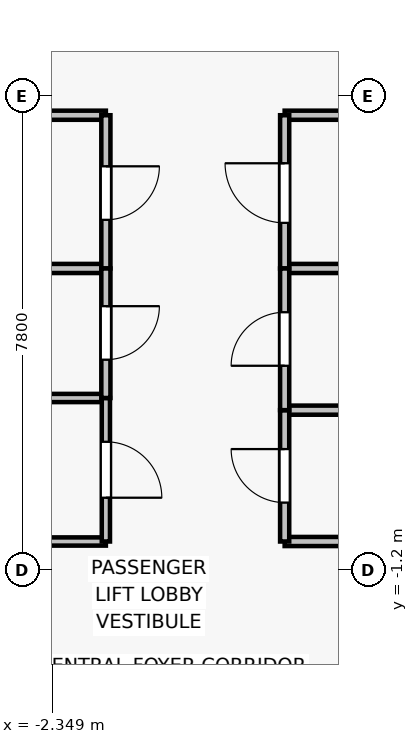
"""IFC4 building model, lengths in metres.
Left out: names, types, materials, properties, quantities, classifications, styles, units other than length and angle.
Written with IfcOpenShell. Run it as: python <this file> out.ifc"""

import sys

from ifc_helpers import new_model, si_unit, direction, frame, frame_2d, origin, place, context, subcontext, project, spatial, rectangle, extrude, source, transform, mapped, element, fill, save


model = new_model("IFC4")
c1 = context("Model", 3, precision=1e-05, world=origin(), true_north=direction((0.0, 1.0)))
c2 = subcontext(c1, "Body", "Model", "MODEL_VIEW")
j1 = project(units=[si_unit("LENGTHUNIT", "METRE"), si_unit("PLANEANGLEUNIT", "RADIAN")], contexts=[c1])
p1 = place(None, origin())
s1 = spatial("IfcSite", under=j1, at=p1, CompositionType="ELEMENT")
p2 = place(p1, origin())
s2 = spatial("IfcBuilding", under=s1, at=p2, CompositionType="ELEMENT")
p3 = place(p2, frame((0.0, 0.0, 222.1)))
s3 = spatial("IfcBuildingStorey", under=s2, at=p3, CompositionType="ELEMENT", Elevation=222.1)
for number, where, z_axis, x_axis in (
    (1, (-1.47, 3.76, 0.0), (0.0, 0.0, 1.0), (-1.0, 0.0, 0.0)),
    (2, (-3.87, 6.28, 0.0), (0.0, 0.0, 1.0), (1.0, 0.0, 0.0)),
):
    element("IfcWall", number, at=place(p3, frame(where, z_axis=z_axis, x_axis=x_axis)), inside=s3, PredefinedType="PARTITIONING", context=c2, shape_type="SweptSolid", body=[
        extrude(rectangle(XDim=2.4, YDim=0.15, at=frame_2d((1.2, 0.0))), origin(), (0.0, 0.0, 1.0), 3.075),
    ])
p4 = place(p3, frame((-1.47, 6.28, 0.0), z_axis=(0.0, 0.0, 1.0), x_axis=(0.0, -1.0, 0.0)))
e3 = element("IfcWall", 3, at=p4, inside=s3, PredefinedType="PARTITIONING", context=c2, shape_type="SweptSolid", body=[
    extrude(rectangle(XDim=2.52, YDim=0.15, at=frame_2d((1.26, 0.0))), origin(), (0.0, 0.0, 1.0), 3.075),
])
p5 = place(p4, frame((0.84, 0.0, 0.0)))
e4 = element("IfcOpeningElement", 4, at=p5, cuts=e3, PredefinedType="OPENING", context=c2, shape_type="SweptSolid", body=[
    extrude(rectangle(XDim=0.88, YDim=2.1, at=frame_2d((0.44, 1.05))), frame((0.0, 0.085, 0.0), z_axis=(0.0, -1.0, 0.0), x_axis=(1.0, 0.0, 0.0)), (0.0, 0.0, 1.0), 0.17),
])
for number, where, z_axis, x_axis in (
    (5, (6.38, 3.76, 0.0), (0.0, 0.0, 1.0), (-1.0, 0.0, 0.0)),
    (6, (1.47, 6.28, 0.0), (0.0, 0.0, 1.0), (1.0, 0.0, 0.0)),
):
    element("IfcWall", number, at=place(p3, frame(where, z_axis=z_axis, x_axis=x_axis)), inside=s3, PredefinedType="PARTITIONING", context=c2, shape_type="SweptSolid", body=[
        extrude(rectangle(XDim=4.91, YDim=0.15, at=frame_2d((2.455, 0.0))), origin(), (0.0, 0.0, 1.0), 3.075),
    ])
p6 = place(p3, frame((1.47, 3.76, 0.0), z_axis=(0.0, 0.0, 1.0), x_axis=(0.0, 1.0, 0.0)))
e7 = element("IfcWall", 7, at=p6, inside=s3, PredefinedType="PARTITIONING", context=c2, shape_type="SweptSolid", body=[
    extrude(rectangle(XDim=2.52, YDim=0.15, at=frame_2d((1.26, 0.0))), origin(), (0.0, 0.0, 1.0), 3.075),
])
p7 = place(p6, frame((0.75, 0.0, 0.0)))
e8 = element("IfcOpeningElement", 8, at=p7, cuts=e7, PredefinedType="OPENING", context=c2, shape_type="SweptSolid", body=[
    extrude(rectangle(XDim=0.98, YDim=2.15, at=frame_2d((0.49, 1.075))), frame((0.0, 0.085, 0.0), z_axis=(0.0, -1.0, 0.0), x_axis=(1.0, 0.0, 0.0)), (0.0, 0.0, 1.0), 0.17),
])
for number, where, z_axis, x_axis in (
    (9, (-1.47, -0.73, 0.0), (0.0, 0.0, 1.0), (-1.0, 0.0, 0.0)),
    (10, (-3.47, 1.63, 0.0), (0.0, 0.0, 1.0), (1.0, 0.0, 0.0)),
):
    element("IfcWall", number, at=place(p3, frame(where, z_axis=z_axis, x_axis=x_axis)), inside=s3, PredefinedType="PARTITIONING", context=c2, shape_type="SweptSolid", body=[
        extrude(rectangle(XDim=2.0, YDim=0.135, at=frame_2d((1.0, 0.0))), origin(), (0.0, 0.0, 1.0), 3.075),
    ])
p8 = place(p3, frame((-1.47, 1.63, 0.0), z_axis=(0.0, 0.0, 1.0), x_axis=(0.0, -1.0, 0.0)))
e11 = element("IfcWall", 11, at=p8, inside=s3, PredefinedType="PARTITIONING", context=c2, shape_type="SweptSolid", body=[
    extrude(rectangle(XDim=2.36, YDim=0.135, at=frame_2d((1.18, 0.0))), origin(), (0.0, 0.0, 1.0), 3.075),
])
p9 = place(p8, frame((0.72, 0.0, 0.0)))
e12 = element("IfcOpeningElement", 12, at=p9, cuts=e11, PredefinedType="OPENING", context=c2, shape_type="SweptSolid", body=[
    extrude(rectangle(XDim=0.92, YDim=2.1, at=frame_2d((0.46, 1.05))), frame((0.0, 0.077, 0.0), z_axis=(0.0, -1.0, 0.0), x_axis=(1.0, 0.0, 0.0)), (0.0, 0.0, 1.0), 0.155),
])
p10 = place(p3, frame((-1.47, 3.76, 0.0), z_axis=(0.0, 0.0, 1.0), x_axis=(0.0, -1.0, 0.0)))
e13 = element("IfcWall", 13, at=p10, inside=s3, PredefinedType="PARTITIONING", context=c2, shape_type="SweptSolid", body=[
    extrude(rectangle(XDim=2.13, YDim=0.15, at=frame_2d((1.065, 0.0))), origin(), (0.0, 0.0, 1.0), 3.075),
])
p11 = place(p10, frame((0.62, 0.0, 0.0)))
e14 = element("IfcOpeningElement", 14, at=p11, cuts=e13, PredefinedType="OPENING", context=c2, shape_type="SweptSolid", body=[
    extrude(rectangle(XDim=0.88, YDim=2.1, at=frame_2d((0.44, 1.05))), frame((0.0, 0.085, 0.0), z_axis=(0.0, -1.0, 0.0), x_axis=(1.0, 0.0, 0.0)), (0.0, 0.0, 1.0), 0.17),
])
for number, where, z_axis, x_axis in (
    (15, (3.68, -0.73, 0.0), (0.0, 0.0, 1.0), (-1.0, 0.0, 0.0)),
    (16, (1.47, 1.43, 0.0), (0.0, 0.0, 1.0), (1.0, 0.0, 0.0)),
):
    element("IfcWall", number, at=place(p3, frame(where, z_axis=z_axis, x_axis=x_axis)), inside=s3, PredefinedType="PARTITIONING", context=c2, shape_type="SweptSolid", body=[
        extrude(rectangle(XDim=2.21, YDim=0.15, at=frame_2d((1.105, 0.0))), origin(), (0.0, 0.0, 1.0), 3.075),
    ])
p12 = place(p3, frame((1.47, -0.73, 0.0), z_axis=(0.0, 0.0, 1.0), x_axis=(0.0, 1.0, 0.0)))
e17 = element("IfcWall", 17, at=p12, inside=s3, PredefinedType="PARTITIONING", context=c2, shape_type="SweptSolid", body=[
    extrude(rectangle(XDim=2.16, YDim=0.15, at=frame_2d((1.08, 0.0))), origin(), (0.0, 0.0, 1.0), 3.075),
])
p13 = place(p12, frame((0.64, 0.0, 0.0)))
e18 = element("IfcOpeningElement", 18, at=p13, cuts=e17, PredefinedType="OPENING", context=c2, shape_type="SweptSolid", body=[
    extrude(rectangle(XDim=0.88, YDim=2.1, at=frame_2d((0.44, 1.05))), frame((0.0, 0.085, 0.0), z_axis=(0.0, -1.0, 0.0), x_axis=(1.0, 0.0, 0.0)), (0.0, 0.0, 1.0), 0.17),
])
p14 = place(p3, frame((1.47, 1.43, 0.0), z_axis=(0.0, 0.0, 1.0), x_axis=(0.0, 1.0, 0.0)))
e19 = element("IfcWall", 19, at=p14, inside=s3, PredefinedType="PARTITIONING", context=c2, shape_type="SweptSolid", body=[
    extrude(rectangle(XDim=2.33, YDim=0.15, at=frame_2d((1.165, 0.0))), origin(), (0.0, 0.0, 1.0), 3.075),
])
p15 = place(p14, frame((0.73, 0.0, 0.0)))
e20 = element("IfcOpeningElement", 20, at=p15, cuts=e19, PredefinedType="OPENING", context=c2, shape_type="SweptSolid", body=[
    extrude(rectangle(XDim=0.88, YDim=2.15, at=frame_2d((0.44, 1.075))), frame((0.0, 0.085, 0.0), z_axis=(0.0, -1.0, 0.0), x_axis=(1.0, 0.0, 0.0)), (0.0, 0.0, 1.0), 0.17),
])
m1 = source(origin(), c2, "Body", "SweptSolid", [
    extrude(rectangle(XDim=0.88, YDim=2.1, at=frame_2d((0.44, 1.05))), frame((0.0, 0.025, 0.0), z_axis=(0.0, -1.0, 0.0), x_axis=(1.0, 0.0, 0.0)), (0.0, 0.0, 1.0), 0.05),
])
p16 = place(p5, origin())
e21 = element("IfcDoor", 21, at=p16, inside=s3, OperationType="SINGLE_SWING_LEFT", PredefinedType="DOOR", context=c2, shape_type="MappedRepresentation", body=[
    mapped(m1, transform((0.0, 0.0, 0.0), x_axis=(1.0, 0.0, 0.0), y_axis=(0.0, 1.0, 0.0), z_axis=(0.0, 0.0, 1.0), scale=1.0)),
])
fill(e4, e21)
m2 = source(origin(), c2, "Body", "SweptSolid", [
    extrude(rectangle(XDim=0.98, YDim=2.15, at=frame_2d((0.49, 1.075))), frame((0.0, 0.025, 0.0), z_axis=(0.0, -1.0, 0.0), x_axis=(1.0, 0.0, 0.0)), (0.0, 0.0, 1.0), 0.05),
])
p17 = place(p7, origin())
e22 = element("IfcDoor", 22, at=p17, inside=s3, OperationType="SINGLE_SWING_RIGHT", PredefinedType="DOOR", context=c2, shape_type="MappedRepresentation", body=[
    mapped(m2, transform((0.0, 0.0, 0.0), x_axis=(1.0, 0.0, 0.0), y_axis=(0.0, 1.0, 0.0), z_axis=(0.0, 0.0, 1.0), scale=1.0)),
])
fill(e8, e22)
m3 = source(origin(), c2, "Body", "SweptSolid", [
    extrude(rectangle(XDim=0.92, YDim=2.1, at=frame_2d((0.46, 1.05))), frame((0.0, 0.025, 0.0), z_axis=(0.0, -1.0, 0.0), x_axis=(1.0, 0.0, 0.0)), (0.0, 0.0, 1.0), 0.05),
])
p18 = place(p9, origin())
e23 = element("IfcDoor", 23, at=p18, inside=s3, OperationType="SINGLE_SWING_RIGHT", PredefinedType="DOOR", context=c2, shape_type="MappedRepresentation", body=[
    mapped(m3, transform((0.0, 0.0, 0.0), x_axis=(1.0, 0.0, 0.0), y_axis=(0.0, 1.0, 0.0), z_axis=(0.0, 0.0, 1.0), scale=1.0)),
])
fill(e12, e23)
p19 = place(p11, origin())
e24 = element("IfcDoor", 24, at=p19, inside=s3, OperationType="SINGLE_SWING_LEFT", PredefinedType="DOOR", context=c2, shape_type="MappedRepresentation", body=[
    mapped(m1, transform((0.0, 0.0, 0.0), x_axis=(1.0, 0.0, 0.0), y_axis=(0.0, 1.0, 0.0), z_axis=(0.0, 0.0, 1.0), scale=1.0)),
])
fill(e14, e24)
p20 = place(p13, origin())
e25 = element("IfcDoor", 25, at=p20, inside=s3, OperationType="SINGLE_SWING_RIGHT", PredefinedType="DOOR", context=c2, shape_type="MappedRepresentation", body=[
    mapped(m1, transform((0.0, 0.0, 0.0), x_axis=(1.0, 0.0, 0.0), y_axis=(0.0, 1.0, 0.0), z_axis=(0.0, 0.0, 1.0), scale=1.0)),
])
fill(e18, e25)
m4 = source(origin(), c2, "Body", "SweptSolid", [
    extrude(rectangle(XDim=0.88, YDim=2.15, at=frame_2d((0.44, 1.075))), frame((0.0, 0.025, 0.0), z_axis=(0.0, -1.0, 0.0), x_axis=(1.0, 0.0, 0.0)), (0.0, 0.0, 1.0), 0.05),
])
p21 = place(p15, origin())
e26 = element("IfcDoor", 26, at=p21, inside=s3, OperationType="SINGLE_SWING_LEFT", PredefinedType="DOOR", context=c2, shape_type="MappedRepresentation", body=[
    mapped(m4, transform((0.0, 0.0, 0.0), x_axis=(1.0, 0.0, 0.0), y_axis=(0.0, 1.0, 0.0), z_axis=(0.0, 0.0, 1.0), scale=1.0)),
])
fill(e20, e26)
save(model, sys.argv[1])
